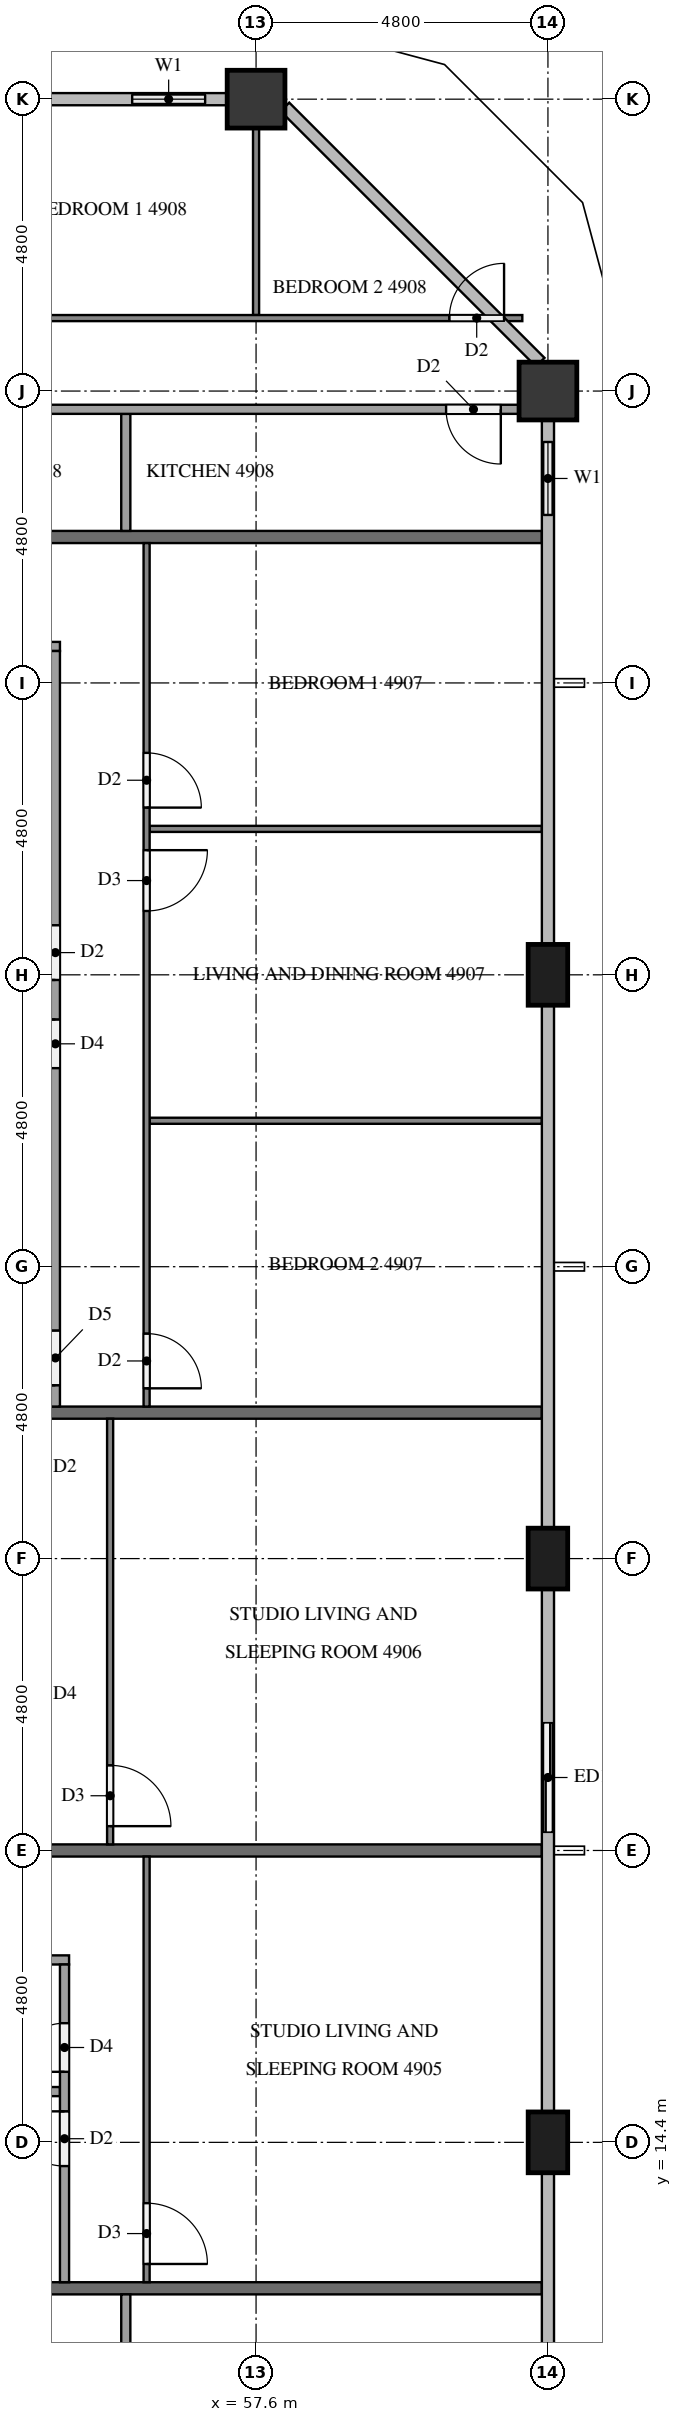
"""IFC4 building model, lengths in metres.
Left out: names, types, materials, properties, quantities, classifications, styles, units other than length and angle.
Written with IfcOpenShell. Run it as: python <this file> out.ifc"""

import sys

from ifc_helpers import new_model, si_unit, direction, frame, frame_2d, origin, origin_2d, place, context, subcontext, project, spatial, rectangle, extrude, element, fill, save


model = new_model("IFC4")
c1 = context("Model", 3, precision=1e-05, world=origin(), true_north=direction((0.0, 1.0)))
c2 = subcontext(c1, "Body", "Model", "MODEL_VIEW")
j1 = project(units=[si_unit("LENGTHUNIT", "METRE"), si_unit("PLANEANGLEUNIT", "RADIAN")], contexts=[c1])
p1 = place(None, origin())
s1 = spatial("IfcSite", under=j1, at=p1, CompositionType="ELEMENT")
p2 = place(p1, origin())
s2 = spatial("IfcBuilding", under=s1, at=p2, CompositionType="ELEMENT")
p3 = place(p2, frame((0.0, 0.0, 189.4)))
s3 = spatial("IfcBuildingStorey", under=s2, at=p3, CompositionType="ELEMENT", Elevation=189.4)
for number, where, z_axis, x_axis in (
    (1, (62.4, 14.4, 0.0), (0.0, 0.0, 1.0), (0.0, 1.0, 0.0)),
    (2, (62.4, 24.0, 0.0), (0.0, 0.0, 1.0), (0.0, 1.0, 0.0)),
    (3, (62.4, 33.6, 0.0), (0.0, 0.0, 1.0), (0.0, 1.0, 0.0)),
):
    element("IfcColumn", number, at=place(p3, frame(where, z_axis=z_axis, x_axis=x_axis)), inside=s3, PredefinedType="COLUMN", context=c2, shape_type="SweptSolid", body=[
        extrude(rectangle(XDim=1.0, YDim=0.65, at=origin_2d()), origin(), (0.0, 0.0, 1.0), 3.2),
    ])
for number, where, z_axis, x_axis in (
    (4, (62.4, 43.2, 0.0), (0.0, 0.0, 1.0), (1.0, 0.0, 0.0)),
    (5, (57.6, 48.0, 0.0), (0.0, 0.0, 1.0), (1.0, 0.0, 0.0)),
):
    element("IfcColumn", number, at=place(p3, frame(where, z_axis=z_axis, x_axis=x_axis)), inside=s3, PredefinedType="COLUMN", context=c2, shape_type="SweptSolid", body=[
        extrude(rectangle(XDim=0.95, YDim=0.95, at=origin_2d()), origin(), (0.0, 0.0, 1.0), 3.2),
    ])
p4 = place(p3, frame((62.4, 19.2, 0.0), z_axis=(0.0, 0.0, 1.0), x_axis=(0.0, 1.0, 0.0)))
e6 = element("IfcWall", 6, at=p4, inside=s3, PredefinedType="SOLIDWALL", context=c2, shape_type="SweptSolid", body=[
    extrude(rectangle(XDim=2.4, YDim=0.15, at=frame_2d((1.2, 0.0))), origin(), (0.0, 0.0, 1.0), 3.2),
])
p5 = place(p4, frame((0.3, 0.0, 0.0)))
e7 = element("IfcOpeningElement", 7, at=p5, cuts=e6, PredefinedType="OPENING", context=c2, shape_type="SweptSolid", body=[
    extrude(rectangle(XDim=1.8, YDim=2.4, at=frame_2d((0.9, 1.2))), frame((0.0, 0.085, 0.0), z_axis=(0.0, -1.0, 0.0), x_axis=(1.0, 0.0, 0.0)), (0.0, 0.0, 1.0), 0.17),
])
p6 = place(p3, frame((62.4, 40.8, 0.0), z_axis=(0.0, 0.0, 1.0), x_axis=(0.0, 1.0, 0.0)))
e8 = element("IfcWall", 8, at=p6, inside=s3, PredefinedType="SOLIDWALL", context=c2, shape_type="SweptSolid", body=[
    extrude(rectangle(XDim=1.925, YDim=0.15, at=frame_2d((0.962, 0.0))), origin(), (0.0, 0.0, 1.0), 3.2),
])
p7 = place(p6, frame((0.363, 0.0, 0.9)))
e9 = element("IfcOpeningElement", 9, at=p7, cuts=e8, PredefinedType="OPENING", context=c2, shape_type="SweptSolid", body=[
    extrude(rectangle(XDim=1.2, YDim=1.4, at=frame_2d((0.6, 0.7))), frame((0.0, 0.085, 0.0), z_axis=(0.0, -1.0, 0.0), x_axis=(1.0, 0.0, 0.0)), (0.0, 0.0, 1.0), 0.17),
])
p8 = place(p3, frame((57.125, 48.0, 0.0), z_axis=(0.0, 0.0, 1.0), x_axis=(-1.0, 0.0, 0.0)))
e10 = element("IfcWall", 10, at=p8, inside=s3, PredefinedType="SOLIDWALL", context=c2, shape_type="SweptSolid", body=[
    extrude(rectangle(XDim=1.925, YDim=0.15, at=frame_2d((0.962, 0.0))), origin(), (0.0, 0.0, 1.0), 3.2),
])
p9 = place(p8, frame((0.363, 0.0, 0.9)))
e11 = element("IfcOpeningElement", 11, at=p9, cuts=e10, PredefinedType="OPENING", context=c2, shape_type="SweptSolid", body=[
    extrude(rectangle(XDim=1.2, YDim=1.4, at=frame_2d((0.6, 0.7))), frame((0.0, 0.085, 0.0), z_axis=(0.0, -1.0, 0.0), x_axis=(1.0, 0.0, 0.0)), (0.0, 0.0, 1.0), 0.17),
])
for number, where, z_axis, x_axis in (
    (12, (50.5, 12.0, 0.0), (0.0, 0.0, 1.0), (1.0, 0.0, 0.0)),
    (13, (50.5, 19.2, 0.0), (0.0, 0.0, 1.0), (1.0, 0.0, 0.0)),
    (14, (50.5, 26.4, 0.0), (0.0, 0.0, 1.0), (1.0, 0.0, 0.0)),
    (15, (50.5, 40.8, 0.0), (0.0, 0.0, 1.0), (1.0, 0.0, 0.0)),
):
    element("IfcWall", number, at=place(p3, frame(where, z_axis=z_axis, x_axis=x_axis)), inside=s3, PredefinedType="PARTITIONING", context=c2, shape_type="SweptSolid", body=[
        extrude(rectangle(XDim=11.8, YDim=0.2, at=frame_2d((5.9, 0.0))), origin(), (0.0, 0.0, 1.0), 3.2),
    ])
p10 = place(p3, frame((55.458, 11.9, 0.0), z_axis=(0.0, 0.0, 1.0), x_axis=(0.0, -1.0, 0.0)))
e16 = element("IfcWall", 16, at=p10, inside=s3, PredefinedType="PARTITIONING", context=c2, shape_type="SweptSolid", body=[
    extrude(rectangle(XDim=4.175, YDim=0.15, at=frame_2d((2.087, 0.0))), origin(), (0.0, 0.0, 1.0), 3.2),
])
p11 = place(p3, frame((55.8, 19.1, 0.0), z_axis=(0.0, 0.0, 1.0), x_axis=(0.0, -1.0, 0.0)))
e17 = element("IfcWall", 17, at=p11, inside=s3, PredefinedType="PARTITIONING", context=c2, shape_type="SweptSolid", body=[
    extrude(rectangle(XDim=7.0, YDim=0.1, at=frame_2d((3.5, 0.0))), origin(), (0.0, 0.0, 1.0), 3.2),
])
p12 = place(p11, frame((5.7, 0.0, 0.0)))
e18 = element("IfcOpeningElement", 18, at=p12, cuts=e17, PredefinedType="OPENING", context=c2, shape_type="SweptSolid", body=[
    extrude(rectangle(XDim=1.0, YDim=2.1, at=frame_2d((0.5, 1.05))), frame((0.0, 0.06, 0.0), z_axis=(0.0, -1.0, 0.0), x_axis=(1.0, 0.0, 0.0)), (0.0, 0.0, 1.0), 0.12),
])
p13 = place(p3, frame((50.5, 15.235, 0.0), z_axis=(0.0, 0.0, 1.0), x_axis=(1.0, 0.0, 0.0)))
e19 = element("IfcWall", 19, at=p13, inside=s3, PredefinedType="PARTITIONING", context=c2, shape_type="SweptSolid", body=[
    extrude(rectangle(XDim=3.875, YDim=0.15, at=frame_2d((1.938, 0.0))), origin(), (0.0, 0.0, 1.0), 3.2),
])
p14 = place(p3, frame((50.5, 17.4, 0.0), z_axis=(0.0, 0.0, 1.0), x_axis=(1.0, 0.0, 0.0)))
e20 = element("IfcWall", 20, at=p14, inside=s3, PredefinedType="PARTITIONING", context=c2, shape_type="SweptSolid", body=[
    extrude(rectangle(XDim=4.025, YDim=0.15, at=frame_2d((2.012, 0.0))), origin(), (0.0, 0.0, 1.0), 3.2),
])
p15 = place(p3, frame((54.45, 12.1, 0.0), z_axis=(0.0, 0.0, 1.0), x_axis=(0.0, 1.0, 0.0)))
e21 = element("IfcWall", 21, at=p15, inside=s3, PredefinedType="PARTITIONING", context=c2, shape_type="SweptSolid", body=[
    extrude(rectangle(XDim=5.225, YDim=0.15, at=frame_2d((2.612, 0.0))), origin(), (0.0, 0.0, 1.0), 3.2),
])
p16 = place(p15, frame((3.46, 0.0, 0.0)))
e22 = element("IfcOpeningElement", 22, at=p16, cuts=e21, PredefinedType="OPENING", context=c2, shape_type="SweptSolid", body=[
    extrude(rectangle(XDim=0.8, YDim=2.1, at=frame_2d((0.4, 1.05))), frame((0.0, 0.085, 0.0), z_axis=(0.0, -1.0, 0.0), x_axis=(1.0, 0.0, 0.0)), (0.0, 0.0, 1.0), 0.17),
])
p17 = place(p15, frame((1.91, 0.0, 0.0)))
e23 = element("IfcOpeningElement", 23, at=p17, cuts=e21, PredefinedType="OPENING", context=c2, shape_type="SweptSolid", body=[
    extrude(rectangle(XDim=0.9, YDim=2.1, at=frame_2d((0.45, 1.05))), frame((0.0, 0.085, 0.0), z_axis=(0.0, -1.0, 0.0), x_axis=(1.0, 0.0, 0.0)), (0.0, 0.0, 1.0), 0.17),
])
p18 = place(p3, frame((55.2, 26.3, 0.0), z_axis=(0.0, 0.0, 1.0), x_axis=(0.0, -1.0, 0.0)))
e24 = element("IfcWall", 24, at=p18, inside=s3, PredefinedType="PARTITIONING", context=c2, shape_type="SweptSolid", body=[
    extrude(rectangle(XDim=7.0, YDim=0.1, at=frame_2d((3.5, 0.0))), origin(), (0.0, 0.0, 1.0), 3.2),
])
p19 = place(p18, frame((5.7, 0.0, 0.0)))
e25 = element("IfcOpeningElement", 25, at=p19, cuts=e24, PredefinedType="OPENING", context=c2, shape_type="SweptSolid", body=[
    extrude(rectangle(XDim=1.0, YDim=2.1, at=frame_2d((0.5, 1.05))), frame((0.0, 0.06, 0.0), z_axis=(0.0, -1.0, 0.0), x_axis=(1.0, 0.0, 0.0)), (0.0, 0.0, 1.0), 0.12),
])
for number, where, z_axis, x_axis in (
    (26, (55.85, 36.0, 0.0), (0.0, 0.0, 1.0), (1.0, 0.0, 0.0)),
    (27, (55.85, 31.2, 0.0), (0.0, 0.0, 1.0), (1.0, 0.0, 0.0)),
):
    element("IfcWall", number, at=place(p3, frame(where, z_axis=z_axis, x_axis=x_axis)), inside=s3, PredefinedType="PARTITIONING", context=c2, shape_type="SweptSolid", body=[
        extrude(rectangle(XDim=6.45, YDim=0.1, at=frame_2d((3.225, 0.0))), origin(), (0.0, 0.0, 1.0), 3.2),
    ])
p20 = place(p3, frame((55.8, 40.7, 0.0), z_axis=(0.0, 0.0, 1.0), x_axis=(0.0, -1.0, 0.0)))
e28 = element("IfcWall", 28, at=p20, inside=s3, PredefinedType="PARTITIONING", context=c2, shape_type="SweptSolid", body=[
    extrude(rectangle(XDim=14.2, YDim=0.1, at=frame_2d((7.1, 0.0))), origin(), (0.0, 0.0, 1.0), 3.2),
])
p21 = place(p20, frame((3.45, 0.0, 0.0)))
e29 = element("IfcOpeningElement", 29, at=p21, cuts=e28, PredefinedType="OPENING", context=c2, shape_type="SweptSolid", body=[
    extrude(rectangle(XDim=0.9, YDim=2.1, at=frame_2d((0.45, 1.05))), frame((0.0, 0.06, 0.0), z_axis=(0.0, -1.0, 0.0), x_axis=(1.0, 0.0, 0.0)), (0.0, 0.0, 1.0), 0.12),
])
p22 = place(p20, frame((5.05, 0.0, 0.0)))
e30 = element("IfcOpeningElement", 30, at=p22, cuts=e28, PredefinedType="OPENING", context=c2, shape_type="SweptSolid", body=[
    extrude(rectangle(XDim=1.0, YDim=2.1, at=frame_2d((0.5, 1.05))), frame((0.0, 0.06, 0.0), z_axis=(0.0, -1.0, 0.0), x_axis=(1.0, 0.0, 0.0)), (0.0, 0.0, 1.0), 0.12),
])
p23 = place(p20, frame((13.0, 0.0, 0.0)))
e31 = element("IfcOpeningElement", 31, at=p23, cuts=e28, PredefinedType="OPENING", context=c2, shape_type="SweptSolid", body=[
    extrude(rectangle(XDim=0.9, YDim=2.1, at=frame_2d((0.45, 1.05))), frame((0.0, 0.06, 0.0), z_axis=(0.0, -1.0, 0.0), x_axis=(1.0, 0.0, 0.0)), (0.0, 0.0, 1.0), 0.12),
])
p24 = place(p3, frame((50.5, 39.0, 0.0), z_axis=(0.0, 0.0, 1.0), x_axis=(1.0, 0.0, 0.0)))
e32 = element("IfcWall", 32, at=p24, inside=s3, PredefinedType="PARTITIONING", context=c2, shape_type="SweptSolid", body=[
    extrude(rectangle(XDim=3.875, YDim=0.15, at=frame_2d((1.938, 0.0))), origin(), (0.0, 0.0, 1.0), 3.2),
])
p25 = place(p3, frame((54.3, 26.5, 0.0), z_axis=(0.0, 0.0, 1.0), x_axis=(0.0, 1.0, 0.0)))
e33 = element("IfcWall", 33, at=p25, inside=s3, PredefinedType="PARTITIONING", context=c2, shape_type="SweptSolid", body=[
    extrude(rectangle(XDim=12.425, YDim=0.15, at=frame_2d((6.212, 0.0))), origin(), (0.0, 0.0, 1.0), 3.2),
])
p26 = place(p25, frame((7.015, 0.0, 0.0)))
e34 = element("IfcOpeningElement", 34, at=p26, cuts=e33, PredefinedType="OPENING", context=c2, shape_type="SweptSolid", body=[
    extrude(rectangle(XDim=0.9, YDim=2.1, at=frame_2d((0.45, 1.05))), frame((0.0, 0.085, 0.0), z_axis=(0.0, -1.0, 0.0), x_axis=(1.0, 0.0, 0.0)), (0.0, 0.0, 1.0), 0.17),
])
p27 = place(p25, frame((5.565, 0.0, 0.0)))
e35 = element("IfcOpeningElement", 35, at=p27, cuts=e33, PredefinedType="OPENING", context=c2, shape_type="SweptSolid", body=[
    extrude(rectangle(XDim=0.8, YDim=2.1, at=frame_2d((0.4, 1.05))), frame((0.0, 0.085, 0.0), z_axis=(0.0, -1.0, 0.0), x_axis=(1.0, 0.0, 0.0)), (0.0, 0.0, 1.0), 0.17),
])
p28 = place(p25, frame((0.35, 0.0, 0.0)))
e36 = element("IfcOpeningElement", 36, at=p28, cuts=e33, PredefinedType="OPENING", context=c2, shape_type="SweptSolid", body=[
    extrude(rectangle(XDim=0.9, YDim=2.1, at=frame_2d((0.45, 1.05))), frame((0.0, 0.085, 0.0), z_axis=(0.0, -1.0, 0.0), x_axis=(1.0, 0.0, 0.0)), (0.0, 0.0, 1.0), 0.17),
])
p29 = place(p3, frame((57.6, 44.45, 0.0), z_axis=(0.0, 0.0, 1.0), x_axis=(0.0, 1.0, 0.0)))
e37 = element("IfcWall", 37, at=p29, inside=s3, PredefinedType="PARTITIONING", context=c2, shape_type="SweptSolid", body=[
    extrude(rectangle(XDim=3.075, YDim=0.1, at=frame_2d((1.538, 0.0))), origin(), (0.0, 0.0, 1.0), 3.2),
])
p30 = place(p3, frame((45.7, 44.4, 0.0), z_axis=(0.0, 0.0, 1.0), x_axis=(1.0, 0.0, 0.0)))
e38 = element("IfcWall", 38, at=p30, inside=s3, PredefinedType="PARTITIONING", context=c2, shape_type="SweptSolid", body=[
    extrude(rectangle(XDim=16.279, YDim=0.1, at=frame_2d((8.139, 0.0))), origin(), (0.0, 0.0, 1.0), 3.2),
])
p31 = place(p30, frame((5.75, 0.0, 0.0)))
e39 = element("IfcOpeningElement", 39, at=p31, cuts=e38, PredefinedType="OPENING", context=c2, shape_type="SweptSolid", body=[
    extrude(rectangle(XDim=1.0, YDim=2.1, at=frame_2d((0.5, 1.05))), frame((0.0, 0.06, 0.0), z_axis=(0.0, -1.0, 0.0), x_axis=(1.0, 0.0, 0.0)), (0.0, 0.0, 1.0), 0.12),
])
p32 = place(p30, frame((7.45, 0.0, 0.0)))
e40 = element("IfcOpeningElement", 40, at=p32, cuts=e38, PredefinedType="OPENING", context=c2, shape_type="SweptSolid", body=[
    extrude(rectangle(XDim=0.9, YDim=2.1, at=frame_2d((0.45, 1.05))), frame((0.0, 0.06, 0.0), z_axis=(0.0, -1.0, 0.0), x_axis=(1.0, 0.0, 0.0)), (0.0, 0.0, 1.0), 0.12),
])
p33 = place(p30, frame((15.079, 0.0, 0.0)))
e41 = element("IfcOpeningElement", 41, at=p33, cuts=e38, PredefinedType="OPENING", context=c2, shape_type="SweptSolid", body=[
    extrude(rectangle(XDim=0.9, YDim=2.1, at=frame_2d((0.45, 1.05))), frame((0.0, 0.06, 0.0), z_axis=(0.0, -1.0, 0.0), x_axis=(1.0, 0.0, 0.0)), (0.0, 0.0, 1.0), 0.12),
])
p34 = place(p3, frame((55.458, 40.9, 0.0), z_axis=(0.0, 0.0, 1.0), x_axis=(0.0, 1.0, 0.0)))
e42 = element("IfcWall", 42, at=p34, inside=s3, PredefinedType="PARTITIONING", context=c2, shape_type="SweptSolid", body=[
    extrude(rectangle(XDim=1.925, YDim=0.15, at=frame_2d((0.962, 0.0))), origin(), (0.0, 0.0, 1.0), 3.2),
])
p35 = place(p3, frame((61.925, 42.9, 0.0), z_axis=(0.0, 0.0, 1.0), x_axis=(-1.0, 0.0, 0.0)))
e43 = element("IfcWall", 43, at=p35, inside=s3, PredefinedType="PARTITIONING", context=c2, shape_type="SweptSolid", body=[
    extrude(rectangle(XDim=14.45, YDim=0.15, at=frame_2d((7.225, 0.0))), origin(), (0.0, 0.0, 1.0), 3.2),
])
p36 = place(p35, frame((11.354, 0.0, 0.0)))
e44 = element("IfcOpeningElement", 44, at=p36, cuts=e43, PredefinedType="OPENING", context=c2, shape_type="SweptSolid", body=[
    extrude(rectangle(XDim=0.8, YDim=2.1, at=frame_2d((0.4, 1.05))), frame((0.0, 0.085, 0.0), z_axis=(0.0, -1.0, 0.0), x_axis=(1.0, 0.0, 0.0)), (0.0, 0.0, 1.0), 0.17),
])
p37 = place(p35, frame((9.804, 0.0, 0.0)))
e45 = element("IfcOpeningElement", 45, at=p37, cuts=e43, PredefinedType="OPENING", context=c2, shape_type="SweptSolid", body=[
    extrude(rectangle(XDim=0.9, YDim=2.1, at=frame_2d((0.45, 1.05))), frame((0.0, 0.085, 0.0), z_axis=(0.0, -1.0, 0.0), x_axis=(1.0, 0.0, 0.0)), (0.0, 0.0, 1.0), 0.17),
])
p38 = place(p35, frame((0.3, 0.0, 0.0)))
e46 = element("IfcOpeningElement", 46, at=p38, cuts=e43, PredefinedType="OPENING", context=c2, shape_type="SweptSolid", body=[
    extrude(rectangle(XDim=0.9, YDim=2.1, at=frame_2d((0.45, 1.05))), frame((0.0, 0.085, 0.0), z_axis=(0.0, -1.0, 0.0), x_axis=(1.0, 0.0, 0.0)), (0.0, 0.0, 1.0), 0.17),
])
p39 = place(p5, origin())
e47 = element("IfcDoor", 47, at=p39, inside=s3, OperationType="SLIDING_TO_RIGHT", PredefinedType="DOOR", context=c2, shape_type="SweptSolid", body=[
    extrude(rectangle(XDim=1.8, YDim=2.4, at=frame_2d((0.9, 1.2))), frame((0.0, 0.025, 0.0), z_axis=(0.0, -1.0, 0.0), x_axis=(1.0, 0.0, 0.0)), (0.0, 0.0, 1.0), 0.05),
])
fill(e7, e47)
p40 = place(p7, origin())
e48 = element("IfcWindow", 48, at=p40, inside=s3, PartitioningType="SINGLE_PANEL", PredefinedType="WINDOW", context=c2, shape_type="SweptSolid", body=[
    extrude(rectangle(XDim=1.2, YDim=1.4, at=frame_2d((0.6, 0.7))), frame((0.0, 0.03, 0.0), z_axis=(0.0, -1.0, 0.0), x_axis=(1.0, 0.0, 0.0)), (0.0, 0.0, 1.0), 0.06),
])
fill(e9, e48)
p41 = place(p9, origin())
e49 = element("IfcWindow", 49, at=p41, inside=s3, PartitioningType="SINGLE_PANEL", PredefinedType="WINDOW", context=c2, shape_type="SweptSolid", body=[
    extrude(rectangle(XDim=1.2, YDim=1.4, at=frame_2d((0.6, 0.7))), frame((0.0, 0.03, 0.0), z_axis=(0.0, -1.0, 0.0), x_axis=(1.0, 0.0, 0.0)), (0.0, 0.0, 1.0), 0.06),
])
fill(e11, e49)
p42 = place(p12, origin())
e50 = element("IfcDoor", 50, at=p42, inside=s3, OperationType="SINGLE_SWING_RIGHT", PredefinedType="DOOR", context=c2, shape_type="SweptSolid", body=[
    extrude(rectangle(XDim=1.0, YDim=2.1, at=frame_2d((0.5, 1.05))), frame((0.0, 0.025, 0.0), z_axis=(0.0, -1.0, 0.0), x_axis=(1.0, 0.0, 0.0)), (0.0, 0.0, 1.0), 0.05),
])
fill(e18, e50)
p43 = place(p16, origin())
e51 = element("IfcDoor", 51, at=p43, inside=s3, OperationType="SINGLE_SWING_LEFT", PredefinedType="DOOR", context=c2, shape_type="SweptSolid", body=[
    extrude(rectangle(XDim=0.8, YDim=2.1, at=frame_2d((0.4, 1.05))), frame((0.0, 0.025, 0.0), z_axis=(0.0, -1.0, 0.0), x_axis=(1.0, 0.0, 0.0)), (0.0, 0.0, 1.0), 0.05),
])
fill(e22, e51)
p44 = place(p17, origin())
e52 = element("IfcDoor", 52, at=p44, inside=s3, OperationType="SINGLE_SWING_RIGHT", PredefinedType="DOOR", context=c2, shape_type="SweptSolid", body=[
    extrude(rectangle(XDim=0.9, YDim=2.1, at=frame_2d((0.45, 1.05))), frame((0.0, 0.025, 0.0), z_axis=(0.0, -1.0, 0.0), x_axis=(1.0, 0.0, 0.0)), (0.0, 0.0, 1.0), 0.05),
])
fill(e23, e52)
p45 = place(p19, origin())
e53 = element("IfcDoor", 53, at=p45, inside=s3, OperationType="SINGLE_SWING_RIGHT", PredefinedType="DOOR", context=c2, shape_type="SweptSolid", body=[
    extrude(rectangle(XDim=1.0, YDim=2.1, at=frame_2d((0.5, 1.05))), frame((0.0, 0.025, 0.0), z_axis=(0.0, -1.0, 0.0), x_axis=(1.0, 0.0, 0.0)), (0.0, 0.0, 1.0), 0.05),
])
fill(e25, e53)
p46 = place(p21, origin())
e54 = element("IfcDoor", 54, at=p46, inside=s3, OperationType="SINGLE_SWING_RIGHT", PredefinedType="DOOR", context=c2, shape_type="SweptSolid", body=[
    extrude(rectangle(XDim=0.9, YDim=2.1, at=frame_2d((0.45, 1.05))), frame((0.0, 0.025, 0.0), z_axis=(0.0, -1.0, 0.0), x_axis=(1.0, 0.0, 0.0)), (0.0, 0.0, 1.0), 0.05),
])
fill(e29, e54)
p47 = place(p22, origin())
e55 = element("IfcDoor", 55, at=p47, inside=s3, OperationType="SINGLE_SWING_LEFT", PredefinedType="DOOR", context=c2, shape_type="SweptSolid", body=[
    extrude(rectangle(XDim=1.0, YDim=2.1, at=frame_2d((0.5, 1.05))), frame((0.0, 0.025, 0.0), z_axis=(0.0, -1.0, 0.0), x_axis=(1.0, 0.0, 0.0)), (0.0, 0.0, 1.0), 0.05),
])
fill(e30, e55)
p48 = place(p23, origin())
e56 = element("IfcDoor", 56, at=p48, inside=s3, OperationType="SINGLE_SWING_RIGHT", PredefinedType="DOOR", context=c2, shape_type="SweptSolid", body=[
    extrude(rectangle(XDim=0.9, YDim=2.1, at=frame_2d((0.45, 1.05))), frame((0.0, 0.025, 0.0), z_axis=(0.0, -1.0, 0.0), x_axis=(1.0, 0.0, 0.0)), (0.0, 0.0, 1.0), 0.05),
])
fill(e31, e56)
p49 = place(p26, origin())
e57 = element("IfcDoor", 57, at=p49, inside=s3, OperationType="SINGLE_SWING_LEFT", PredefinedType="DOOR", context=c2, shape_type="SweptSolid", body=[
    extrude(rectangle(XDim=0.9, YDim=2.1, at=frame_2d((0.45, 1.05))), frame((0.0, 0.025, 0.0), z_axis=(0.0, -1.0, 0.0), x_axis=(1.0, 0.0, 0.0)), (0.0, 0.0, 1.0), 0.05),
])
fill(e34, e57)
p50 = place(p27, origin())
e58 = element("IfcDoor", 58, at=p50, inside=s3, OperationType="SINGLE_SWING_RIGHT", PredefinedType="DOOR", context=c2, shape_type="SweptSolid", body=[
    extrude(rectangle(XDim=0.8, YDim=2.1, at=frame_2d((0.4, 1.05))), frame((0.0, 0.025, 0.0), z_axis=(0.0, -1.0, 0.0), x_axis=(1.0, 0.0, 0.0)), (0.0, 0.0, 1.0), 0.05),
])
fill(e35, e58)
p51 = place(p28, origin())
e59 = element("IfcDoor", 59, at=p51, inside=s3, OperationType="SINGLE_SWING_LEFT", PredefinedType="DOOR", context=c2, shape_type="SweptSolid", body=[
    extrude(rectangle(XDim=0.9, YDim=2.1, at=frame_2d((0.45, 1.05))), frame((0.0, 0.025, 0.0), z_axis=(0.0, -1.0, 0.0), x_axis=(1.0, 0.0, 0.0)), (0.0, 0.0, 1.0), 0.05),
])
fill(e36, e59)
p52 = place(p33, origin())
e60 = element("IfcDoor", 60, at=p52, inside=s3, OperationType="SINGLE_SWING_RIGHT", PredefinedType="DOOR", context=c2, shape_type="SweptSolid", body=[
    extrude(rectangle(XDim=0.9, YDim=2.1, at=frame_2d((0.45, 1.05))), frame((0.0, 0.025, 0.0), z_axis=(0.0, -1.0, 0.0), x_axis=(1.0, 0.0, 0.0)), (0.0, 0.0, 1.0), 0.05),
])
fill(e41, e60)
p53 = place(p38, origin())
e61 = element("IfcDoor", 61, at=p53, inside=s3, OperationType="SINGLE_SWING_LEFT", PredefinedType="DOOR", context=c2, shape_type="SweptSolid", body=[
    extrude(rectangle(XDim=0.9, YDim=2.1, at=frame_2d((0.45, 1.05))), frame((0.0, 0.025, 0.0), z_axis=(0.0, -1.0, 0.0), x_axis=(1.0, 0.0, 0.0)), (0.0, 0.0, 1.0), 0.05),
])
fill(e46, e61)
save(model, sys.argv[1])
